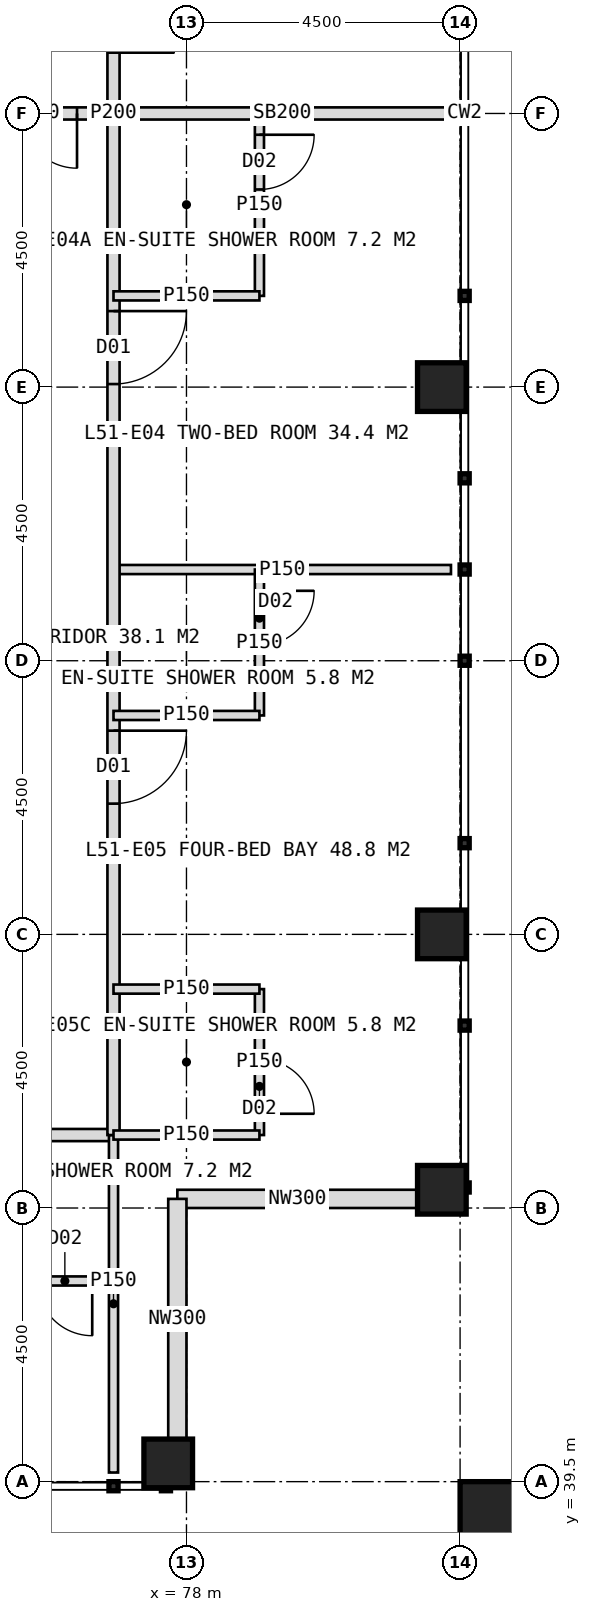
"""IFC4 building model, lengths in metres.
Left out: names, types, materials, properties, quantities, classifications, styles, units other than length and angle.
Written with IfcOpenShell. Run it as: python <this file> out.ifc"""

import sys

from ifc_helpers import new_model, si_unit, direction, frame, frame_2d, origin, origin_2d, place, context, subcontext, project, spatial, rectangle, hollow_rectangle, extrude, element, fill, save


model = new_model("IFC4")
c1 = context("Model", 3, precision=1e-05, world=origin(), true_north=direction((0.0, 1.0)))
c2 = subcontext(c1, "Body", "Model", "MODEL_VIEW")
j1 = project(units=[si_unit("LENGTHUNIT", "METRE"), si_unit("PLANEANGLEUNIT", "RADIAN")], contexts=[c1])
p1 = place(None, origin())
s1 = spatial("IfcSite", under=j1, at=p1, CompositionType="ELEMENT")
p2 = place(p1, origin())
s2 = spatial("IfcBuilding", under=s1, at=p2, CompositionType="ELEMENT")
p3 = place(p2, frame((0.0, 0.0, 213.0)))
s3 = spatial("IfcBuildingStorey", under=s2, at=p3, CompositionType="ELEMENT", Elevation=213.0)
for number, where, z_axis, x_axis in (
    (1, (82.2, 44.3, 0.0), (0.0, 0.0, 1.0), (1.0, 0.0, 0.0)),
    (2, (82.2, 48.5, 0.0), (0.0, 0.0, 1.0), (1.0, 0.0, 0.0)),
    (3, (82.2, 57.5, 0.0), (0.0, 0.0, 1.0), (1.0, 0.0, 0.0)),
    (4, (77.7, 39.8, 0.0), (0.0, 0.0, 1.0), (1.0, 0.0, 0.0)),
):
    element("IfcColumn", number, at=place(p3, frame(where, z_axis=z_axis, x_axis=x_axis)), inside=s3, PredefinedType="COLUMN", context=c2, shape_type="SweptSolid", body=[
        extrude(hollow_rectangle(XDim=0.8, YDim=0.8, WallThickness=0.08, at=origin_2d()), origin(), (0.0, 0.0, 1.0), 4.0),
    ])
p4 = place(p3, frame((83.1, 38.9, 0.0), z_axis=(0.0, 0.0, 1.0), x_axis=(1.0, 0.0, 0.0)))
e5 = element("IfcColumn", 5, at=p4, inside=s3, PredefinedType="COLUMN", context=c2, shape_type="SweptSolid", body=[
    extrude(hollow_rectangle(XDim=1.2, YDim=1.2, WallThickness=0.07, at=origin_2d()), origin(), (0.0, 0.0, 1.0), 4.0),
])
for number, where, z_axis, x_axis in (
    (6, (81.8, 44.15, 0.0), (0.0, 0.0, 1.0), (-1.0, 0.0, 0.0)),
    (7, (77.85, 44.15, 0.0), (0.0, 0.0, 1.0), (0.0, -1.0, 0.0)),
):
    element("IfcWall", number, at=place(p3, frame(where, z_axis=z_axis, x_axis=x_axis)), inside=s3, PredefinedType="ELEMENTEDWALL", context=c2, shape_type="SweptSolid", body=[
        extrude(rectangle(XDim=3.95, YDim=0.3, at=frame_2d((1.975, 0.0))), origin(), (0.0, 0.0, 1.0), 2.85),
    ])
p5 = place(p3, frame((76.8, 45.2, 0.0), z_axis=(0.0, 0.0, 1.0), x_axis=(-1.0, 0.0, 0.0)))
e8 = element("IfcWall", 8, at=p5, inside=s3, PredefinedType="PARTITIONING", context=c2, shape_type="SweptSolid", body=[
    extrude(rectangle(XDim=33.6, YDim=0.2, at=frame_2d((16.8, 0.0))), origin(), (0.0, 0.0, 1.0), 3.75),
])
p6 = place(p5, frame((3.25, 0.0, 0.0)))
e9 = element("IfcOpeningElement", 9, at=p6, cuts=e8, PredefinedType="OPENING", context=c2, shape_type="SweptSolid", body=[
    extrude(rectangle(XDim=1.2, YDim=2.2, at=frame_2d((0.6, 1.1))), frame((0.0, 0.11, 0.0), z_axis=(0.0, -1.0, 0.0), x_axis=(1.0, 0.0, 0.0)), (0.0, 0.0, 1.0), 0.22),
])
p7 = place(p5, frame((11.05, 0.0, 0.0)))
e10 = element("IfcOpeningElement", 10, at=p7, cuts=e8, PredefinedType="OPENING", context=c2, shape_type="SweptSolid", body=[
    extrude(rectangle(XDim=1.2, YDim=2.2, at=frame_2d((0.6, 1.1))), frame((0.0, 0.11, 0.0), z_axis=(0.0, -1.0, 0.0), x_axis=(1.0, 0.0, 0.0)), (0.0, 0.0, 1.0), 0.22),
])
p8 = place(p5, frame((20.05, 0.0, 0.0)))
e11 = element("IfcOpeningElement", 11, at=p8, cuts=e8, PredefinedType="OPENING", context=c2, shape_type="SweptSolid", body=[
    extrude(rectangle(XDim=1.2, YDim=2.2, at=frame_2d((0.6, 1.1))), frame((0.0, 0.11, 0.0), z_axis=(0.0, -1.0, 0.0), x_axis=(1.0, 0.0, 0.0)), (0.0, 0.0, 1.0), 0.22),
])
p9 = place(p5, frame((29.05, 0.0, 0.0)))
e12 = element("IfcOpeningElement", 12, at=p9, cuts=e8, PredefinedType="OPENING", context=c2, shape_type="SweptSolid", body=[
    extrude(rectangle(XDim=1.2, YDim=2.2, at=frame_2d((0.6, 1.1))), frame((0.0, 0.11, 0.0), z_axis=(0.0, -1.0, 0.0), x_axis=(1.0, 0.0, 0.0)), (0.0, 0.0, 1.0), 0.22),
])
p10 = place(p3, frame((76.8, 45.2, 0.0), z_axis=(0.0, 0.0, 1.0), x_axis=(0.0, -1.0, 0.0)))
e13 = element("IfcWall", 13, at=p10, inside=s3, PredefinedType="PARTITIONING", context=c2, shape_type="SweptSolid", body=[
    extrude(rectangle(XDim=5.55, YDim=0.15, at=frame_2d((2.775, 0.0))), origin(), (0.0, 0.0, 1.0), 3.75),
])
p11 = place(p3, frame((76.8, 42.8, 0.0), z_axis=(0.0, 0.0, 1.0), x_axis=(-1.0, 0.0, 0.0)))
e14 = element("IfcWall", 14, at=p11, inside=s3, PredefinedType="PARTITIONING", context=c2, shape_type="SweptSolid", body=[
    extrude(rectangle(XDim=3.0, YDim=0.15, at=frame_2d((1.5, 0.0))), origin(), (0.0, 0.0, 1.0), 3.75),
])
p12 = place(p11, frame((0.35, 0.0, 0.0)))
e15 = element("IfcOpeningElement", 15, at=p12, cuts=e14, PredefinedType="OPENING", context=c2, shape_type="SweptSolid", body=[
    extrude(rectangle(XDim=0.9, YDim=2.1, at=frame_2d((0.45, 1.05))), frame((0.0, 0.085, 0.0), z_axis=(0.0, -1.0, 0.0), x_axis=(1.0, 0.0, 0.0)), (0.0, 0.0, 1.0), 0.17),
])
p13 = place(p3, frame((76.8, 62.0, 0.0), z_axis=(0.0, 0.0, 1.0), x_axis=(1.0, 0.0, 0.0)))
e16 = element("IfcWall", 16, at=p13, inside=s3, PredefinedType="SOLIDWALL", context=c2, shape_type="SweptSolid", body=[
    extrude(rectangle(XDim=5.55, YDim=0.2, at=frame_2d((2.775, 0.0))), origin(), (0.0, 0.0, 1.0), 2.95),
])
p14 = place(p3, frame((76.8, 54.5, 0.0), z_axis=(0.0, 0.0, 1.0), x_axis=(1.0, 0.0, 0.0)))
e17 = element("IfcWall", 17, at=p14, inside=s3, PredefinedType="PARTITIONING", context=c2, shape_type="SweptSolid", body=[
    extrude(rectangle(XDim=5.55, YDim=0.15, at=frame_2d((2.775, 0.0))), origin(), (0.0, 0.0, 1.0), 3.75),
])
p15 = place(p3, frame((76.8, 78.8, 0.0), z_axis=(0.0, 0.0, 1.0), x_axis=(0.0, -1.0, 0.0)))
e18 = element("IfcWall", 18, at=p15, inside=s3, PredefinedType="PARTITIONING", context=c2, shape_type="SweptSolid", body=[
    extrude(rectangle(XDim=33.6, YDim=0.2, at=frame_2d((16.8, 0.0))), origin(), (0.0, 0.0, 1.0), 3.75),
])
p16 = place(p15, frame((3.25, 0.0, 0.0)))
e19 = element("IfcOpeningElement", 19, at=p16, cuts=e18, PredefinedType="OPENING", context=c2, shape_type="SweptSolid", body=[
    extrude(rectangle(XDim=1.2, YDim=2.2, at=frame_2d((0.6, 1.1))), frame((0.0, 0.11, 0.0), z_axis=(0.0, -1.0, 0.0), x_axis=(1.0, 0.0, 0.0)), (0.0, 0.0, 1.0), 0.22),
])
p17 = place(p15, frame((10.45, 0.0, 0.0)))
e20 = element("IfcOpeningElement", 20, at=p17, cuts=e18, PredefinedType="OPENING", context=c2, shape_type="SweptSolid", body=[
    extrude(rectangle(XDim=1.2, YDim=2.2, at=frame_2d((0.6, 1.1))), frame((0.0, 0.11, 0.0), z_axis=(0.0, -1.0, 0.0), x_axis=(1.0, 0.0, 0.0)), (0.0, 0.0, 1.0), 0.22),
])
p18 = place(p15, frame((14.8, 0.0, 0.0)))
e21 = element("IfcOpeningElement", 21, at=p18, cuts=e18, PredefinedType="OPENING", context=c2, shape_type="SweptSolid", body=[
    extrude(rectangle(XDim=1.0, YDim=2.1, at=frame_2d((0.5, 1.05))), frame((0.0, 0.11, 0.0), z_axis=(0.0, -1.0, 0.0), x_axis=(1.0, 0.0, 0.0)), (0.0, 0.0, 1.0), 0.22),
])
p19 = place(p15, frame((20.05, 0.0, 0.0)))
e22 = element("IfcOpeningElement", 22, at=p19, cuts=e18, PredefinedType="OPENING", context=c2, shape_type="SweptSolid", body=[
    extrude(rectangle(XDim=1.2, YDim=2.2, at=frame_2d((0.6, 1.1))), frame((0.0, 0.11, 0.0), z_axis=(0.0, -1.0, 0.0), x_axis=(1.0, 0.0, 0.0)), (0.0, 0.0, 1.0), 0.22),
])
p20 = place(p15, frame((26.95, 0.0, 0.0)))
e23 = element("IfcOpeningElement", 23, at=p20, cuts=e18, PredefinedType="OPENING", context=c2, shape_type="SweptSolid", body=[
    extrude(rectangle(XDim=1.2, YDim=2.2, at=frame_2d((0.6, 1.1))), frame((0.0, 0.11, 0.0), z_axis=(0.0, -1.0, 0.0), x_axis=(1.0, 0.0, 0.0)), (0.0, 0.0, 1.0), 0.22),
])
p21 = place(p3, frame((79.2, 62.0, 0.0), z_axis=(0.0, 0.0, 1.0), x_axis=(0.0, -1.0, 0.0)))
e24 = element("IfcWall", 24, at=p21, inside=s3, PredefinedType="PARTITIONING", context=c2, shape_type="SweptSolid", body=[
    extrude(rectangle(XDim=3.0, YDim=0.15, at=frame_2d((1.5, 0.0))), origin(), (0.0, 0.0, 1.0), 3.75),
])
p22 = place(p21, frame((0.35, 0.0, 0.0)))
e25 = element("IfcOpeningElement", 25, at=p22, cuts=e24, PredefinedType="OPENING", context=c2, shape_type="SweptSolid", body=[
    extrude(rectangle(XDim=0.9, YDim=2.1, at=frame_2d((0.45, 1.05))), frame((0.0, 0.085, 0.0), z_axis=(0.0, -1.0, 0.0), x_axis=(1.0, 0.0, 0.0)), (0.0, 0.0, 1.0), 0.17),
])
p23 = place(p3, frame((76.8, 59.0, 0.0), z_axis=(0.0, 0.0, 1.0), x_axis=(1.0, 0.0, 0.0)))
e26 = element("IfcWall", 26, at=p23, inside=s3, PredefinedType="PARTITIONING", context=c2, shape_type="SweptSolid", body=[
    extrude(rectangle(XDim=2.4, YDim=0.15, at=frame_2d((1.2, 0.0))), origin(), (0.0, 0.0, 1.0), 3.75),
])
p24 = place(p3, frame((79.2, 54.5, 0.0), z_axis=(0.0, 0.0, 1.0), x_axis=(0.0, -1.0, 0.0)))
e27 = element("IfcWall", 27, at=p24, inside=s3, PredefinedType="PARTITIONING", context=c2, shape_type="SweptSolid", body=[
    extrude(rectangle(XDim=2.4, YDim=0.15, at=frame_2d((1.2, 0.0))), origin(), (0.0, 0.0, 1.0), 3.75),
])
p25 = place(p24, frame((0.35, 0.0, 0.0)))
e28 = element("IfcOpeningElement", 28, at=p25, cuts=e27, PredefinedType="OPENING", context=c2, shape_type="SweptSolid", body=[
    extrude(rectangle(XDim=0.9, YDim=2.1, at=frame_2d((0.45, 1.05))), frame((0.0, 0.085, 0.0), z_axis=(0.0, -1.0, 0.0), x_axis=(1.0, 0.0, 0.0)), (0.0, 0.0, 1.0), 0.17),
])
p26 = place(p3, frame((76.8, 52.1, 0.0), z_axis=(0.0, 0.0, 1.0), x_axis=(1.0, 0.0, 0.0)))
e29 = element("IfcWall", 29, at=p26, inside=s3, PredefinedType="PARTITIONING", context=c2, shape_type="SweptSolid", body=[
    extrude(rectangle(XDim=2.4, YDim=0.15, at=frame_2d((1.2, 0.0))), origin(), (0.0, 0.0, 1.0), 3.75),
])
p27 = place(p3, frame((79.2, 47.6, 0.0), z_axis=(0.0, 0.0, 1.0), x_axis=(0.0, -1.0, 0.0)))
e30 = element("IfcWall", 30, at=p27, inside=s3, PredefinedType="PARTITIONING", context=c2, shape_type="SweptSolid", body=[
    extrude(rectangle(XDim=2.4, YDim=0.15, at=frame_2d((1.2, 0.0))), origin(), (0.0, 0.0, 1.0), 3.75),
])
p28 = place(p27, frame((1.15, 0.0, 0.0)))
e31 = element("IfcOpeningElement", 31, at=p28, cuts=e30, PredefinedType="OPENING", context=c2, shape_type="SweptSolid", body=[
    extrude(rectangle(XDim=0.9, YDim=2.1, at=frame_2d((0.45, 1.05))), frame((0.0, 0.085, 0.0), z_axis=(0.0, -1.0, 0.0), x_axis=(1.0, 0.0, 0.0)), (0.0, 0.0, 1.0), 0.17),
])
for number, where, z_axis, x_axis in (
    (32, (76.8, 47.6, 0.0), (0.0, 0.0, 1.0), (1.0, 0.0, 0.0)),
    (33, (76.8, 45.2, 0.0), (0.0, 0.0, 1.0), (1.0, 0.0, 0.0)),
):
    element("IfcWall", number, at=place(p3, frame(where, z_axis=z_axis, x_axis=x_axis)), inside=s3, PredefinedType="PARTITIONING", context=c2, shape_type="SweptSolid", body=[
        extrude(rectangle(XDim=2.4, YDim=0.15, at=frame_2d((1.2, 0.0))), origin(), (0.0, 0.0, 1.0), 3.75),
    ])
p29 = place(p3, frame((74.1, 62.0, 0.0), z_axis=(0.0, 0.0, 1.0), x_axis=(1.0, 0.0, 0.0)))
e34 = element("IfcWall", 34, at=p29, inside=s3, PredefinedType="SOLIDWALL", context=c2, shape_type="SweptSolid", body=[
    extrude(rectangle(XDim=2.7, YDim=0.2, at=frame_2d((1.35, 0.0))), origin(), (0.0, 0.0, 1.0), 2.95),
])
p30 = place(p29, frame((0.3, 0.0, 0.0)))
e35 = element("IfcOpeningElement", 35, at=p30, cuts=e34, PredefinedType="OPENING", context=c2, shape_type="SweptSolid", body=[
    extrude(rectangle(XDim=1.8, YDim=2.2, at=frame_2d((0.9, 1.1))), frame((0.0, 0.11, 0.0), z_axis=(0.0, -1.0, 0.0), x_axis=(1.0, 0.0, 0.0)), (0.0, 0.0, 1.0), 0.22),
])
p31 = place(p12, origin())
e36 = element("IfcDoor", 36, at=p31, inside=s3, OperationType="SINGLE_SWING_LEFT", PredefinedType="DOOR", context=c2, shape_type="SweptSolid", body=[
    extrude(rectangle(XDim=0.9, YDim=2.1, at=frame_2d((0.45, 1.05))), frame((0.0, 0.025, 0.0), z_axis=(0.0, -1.0, 0.0), x_axis=(1.0, 0.0, 0.0)), (0.0, 0.0, 1.0), 0.05),
])
fill(e15, e36)
p32 = place(p19, origin())
e37 = element("IfcDoor", 37, at=p32, inside=s3, OperationType="SINGLE_SWING_LEFT", PredefinedType="DOOR", context=c2, shape_type="SweptSolid", body=[
    extrude(rectangle(XDim=1.2, YDim=2.2, at=frame_2d((0.6, 1.1))), frame((0.0, 0.025, 0.0), z_axis=(0.0, -1.0, 0.0), x_axis=(1.0, 0.0, 0.0)), (0.0, 0.0, 1.0), 0.05),
])
fill(e22, e37)
p33 = place(p22, origin())
e38 = element("IfcDoor", 38, at=p33, inside=s3, OperationType="SINGLE_SWING_LEFT", PredefinedType="DOOR", context=c2, shape_type="SweptSolid", body=[
    extrude(rectangle(XDim=0.9, YDim=2.1, at=frame_2d((0.45, 1.05))), frame((0.0, 0.025, 0.0), z_axis=(0.0, -1.0, 0.0), x_axis=(1.0, 0.0, 0.0)), (0.0, 0.0, 1.0), 0.05),
])
fill(e25, e38)
p34 = place(p20, origin())
e39 = element("IfcDoor", 39, at=p34, inside=s3, OperationType="SINGLE_SWING_LEFT", PredefinedType="DOOR", context=c2, shape_type="SweptSolid", body=[
    extrude(rectangle(XDim=1.2, YDim=2.2, at=frame_2d((0.6, 1.1))), frame((0.0, 0.025, 0.0), z_axis=(0.0, -1.0, 0.0), x_axis=(1.0, 0.0, 0.0)), (0.0, 0.0, 1.0), 0.05),
])
fill(e23, e39)
p35 = place(p25, origin())
e40 = element("IfcDoor", 40, at=p35, inside=s3, OperationType="SINGLE_SWING_LEFT", PredefinedType="DOOR", context=c2, shape_type="SweptSolid", body=[
    extrude(rectangle(XDim=0.9, YDim=2.1, at=frame_2d((0.45, 1.05))), frame((0.0, 0.025, 0.0), z_axis=(0.0, -1.0, 0.0), x_axis=(1.0, 0.0, 0.0)), (0.0, 0.0, 1.0), 0.05),
])
fill(e28, e40)
p36 = place(p28, origin())
e41 = element("IfcDoor", 41, at=p36, inside=s3, OperationType="SINGLE_SWING_RIGHT", PredefinedType="DOOR", context=c2, shape_type="SweptSolid", body=[
    extrude(rectangle(XDim=0.9, YDim=2.1, at=frame_2d((0.45, 1.05))), frame((0.0, 0.025, 0.0), z_axis=(0.0, -1.0, 0.0), x_axis=(1.0, 0.0, 0.0)), (0.0, 0.0, 1.0), 0.05),
])
fill(e31, e41)
p37 = place(p30, origin())
e42 = element("IfcDoor", 42, at=p37, inside=s3, OperationType="DOUBLE_DOOR_DOUBLE_SWING", PredefinedType="DOOR", context=c2, shape_type="SweptSolid", body=[
    extrude(rectangle(XDim=1.8, YDim=2.2, at=frame_2d((0.9, 1.1))), frame((0.0, 0.025, 0.0), z_axis=(0.0, -1.0, 0.0), x_axis=(1.0, 0.0, 0.0)), (0.0, 0.0, 1.0), 0.05),
])
fill(e35, e42)
save(model, sys.argv[1])
